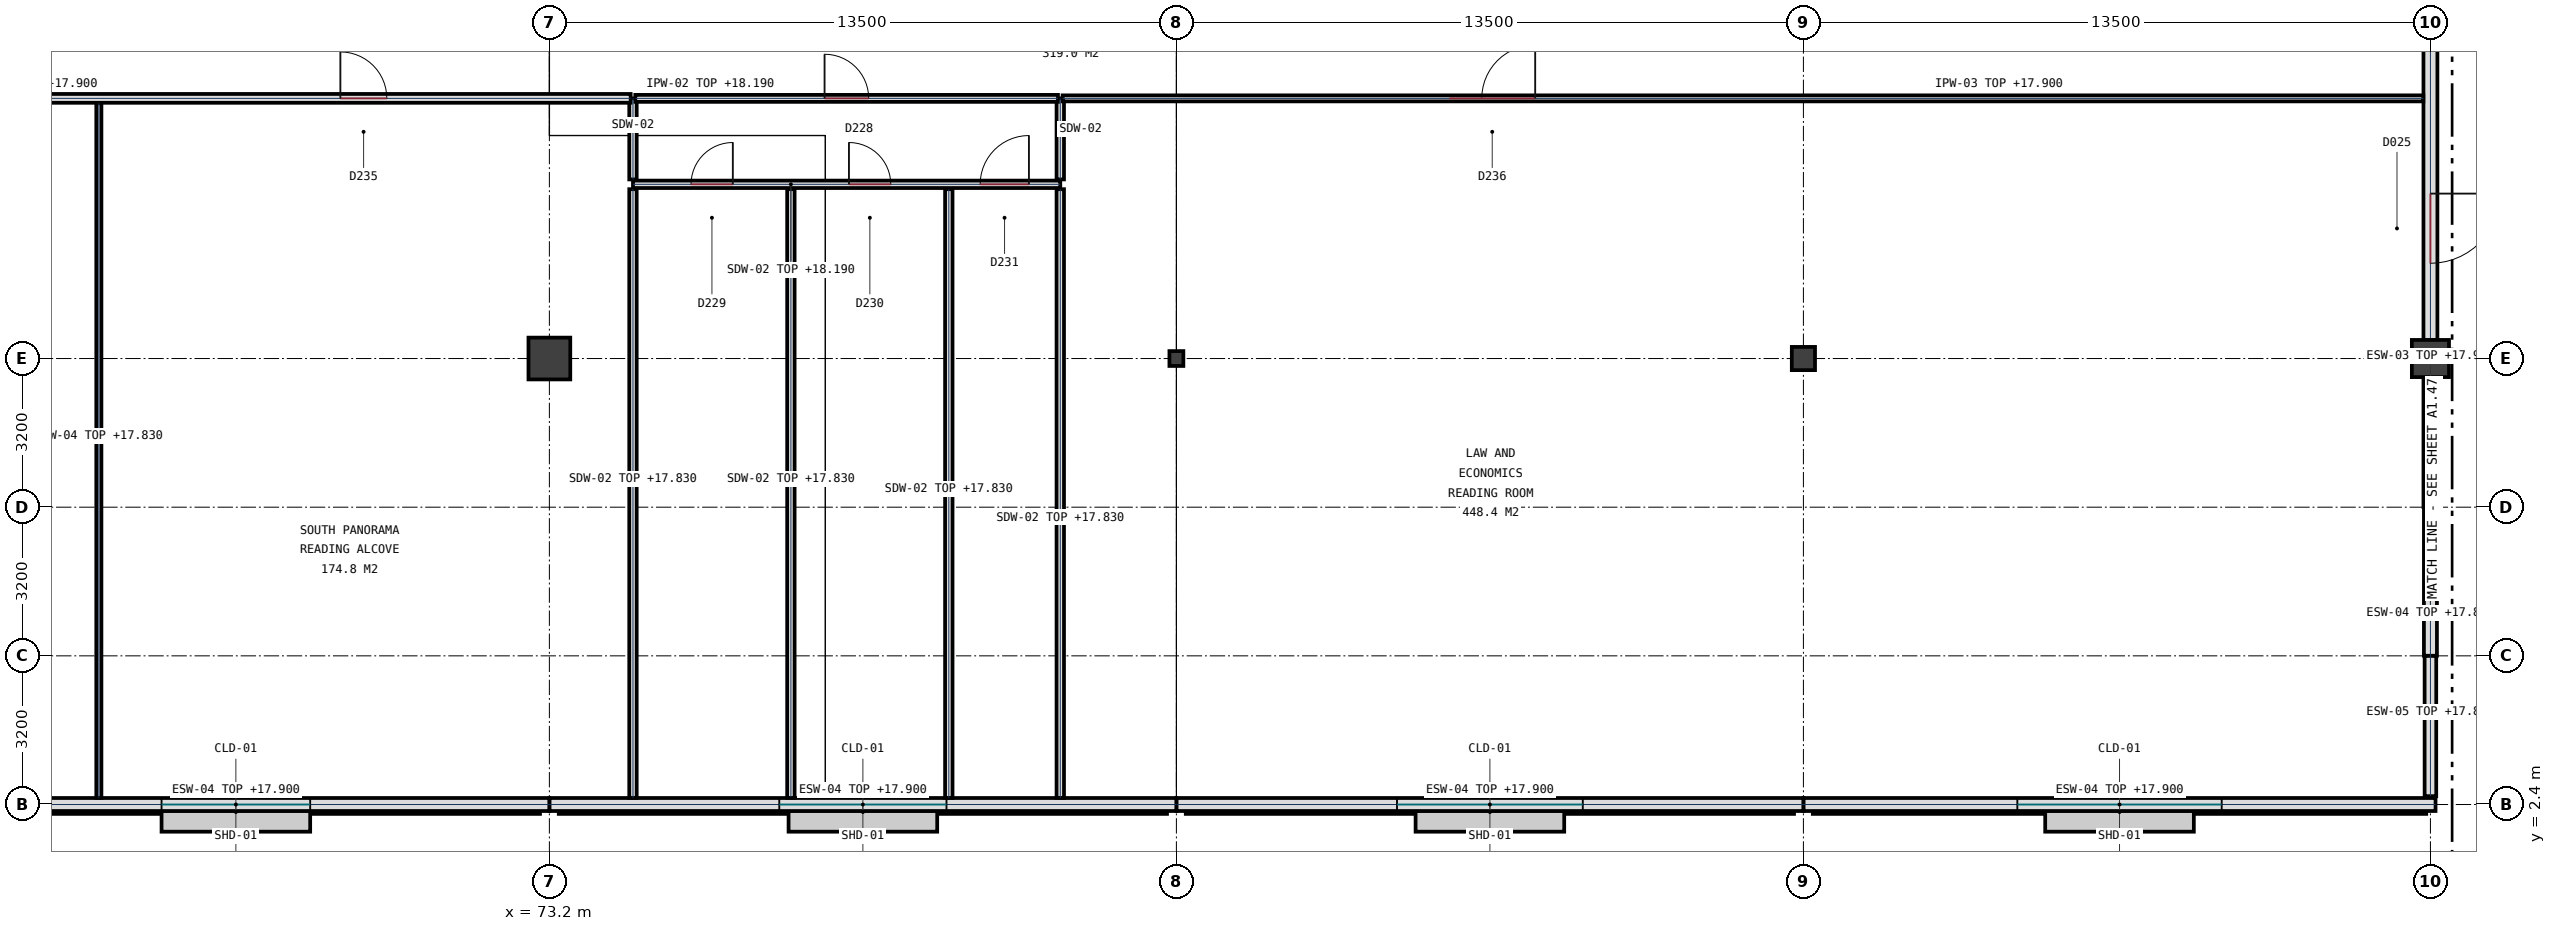
"""IFC4 building model, lengths in metres.
Left out: names, types, materials, properties, quantities, classifications, styles, units other than length and angle.
Written with IfcOpenShell. Run it as: python <this file> out.ifc"""

import sys

from ifc_helpers import new_model, si_unit, direction, frame, frame_2d, origin, origin_2d, place, context, subcontext, project, spatial, polyline, rectangle, circle, i_section, outline, extrude, element, fill, save


model = new_model("IFC4")
c1 = context("Model", 3, precision=1e-05, world=origin(), true_north=direction((0.0, 1.0)))
c2 = subcontext(c1, "Body", "Model", "MODEL_VIEW")
j1 = project(units=[si_unit("LENGTHUNIT", "METRE"), si_unit("PLANEANGLEUNIT", "RADIAN")], contexts=[c1])
p1 = place(None, origin())
s1 = spatial("IfcSite", under=j1, at=p1, CompositionType="ELEMENT")
p2 = place(p1, origin())
s2 = spatial("IfcBuilding", under=s1, at=p2, CompositionType="ELEMENT")
p3 = place(p2, frame((0.0, 0.0, 14.4)))
s3 = spatial("IfcBuildingStorey", under=s2, at=p3, CompositionType="ELEMENT", Elevation=14.4)
p4 = place(p3, frame((73.2, 12.0, 0.0), z_axis=(0.0, 0.0, 1.0), x_axis=(1.0, 0.0, 0.0)))
e1 = element("IfcColumn", 1, at=p4, inside=s3, PredefinedType="COLUMN", context=c2, shape_type="SweptSolid", body=[
    extrude(circle(Radius=0.45, at=origin_2d()), origin(), (0.0, 0.0, 1.0), 4.5),
])
p5 = place(p3, frame((86.7, 12.0, 0.0), z_axis=(0.0, 0.0, 1.0), x_axis=(1.0, 0.0, 0.0)))
e2 = element("IfcColumn", 2, at=p5, inside=s3, PredefinedType="COLUMN", context=c2, shape_type="SweptSolid", body=[
    extrude(i_section(OverallWidth=0.3, OverallDepth=0.32, WebThickness=0.011, FlangeThickness=0.021, FilletRadius=0.027, at=origin_2d()), origin(), (0.0, 0.0, 1.0), 4.5),
])
p6 = place(p3, frame((100.2, 12.0, 0.0), z_axis=(0.0, 0.0, 1.0), x_axis=(1.0, 0.0, 0.0)))
e3 = element("IfcColumn", 3, at=p6, inside=s3, PredefinedType="COLUMN", context=c2, shape_type="SweptSolid", body=[
    extrude(rectangle(XDim=0.5, YDim=0.5, at=origin_2d()), origin(), (0.0, 0.0, 1.0), 4.5),
])
p7 = place(p3, frame((113.7, 12.0, 0.0), z_axis=(0.0, 0.0, 1.0), x_axis=(1.0, 0.0, 0.0)))
e4 = element("IfcColumn", 4, at=p7, inside=s3, PredefinedType="COLUMN", context=c2, shape_type="SweptSolid", body=[
    extrude(circle(Radius=0.4, at=origin_2d()), origin(), (0.0, 0.0, 1.0), 4.5),
])
p8 = place(p3, frame((113.7, 21.399, 0.0), z_axis=(0.0, 0.0, 1.0), x_axis=(0.0, -1.0, 0.0)))
e5 = element("IfcWall", 5, at=p8, inside=s3, PredefinedType="SOLIDWALL", context=c2, shape_type="SweptSolid", body=[
    extrude(rectangle(XDim=9.001, YDim=0.3, at=frame_2d((4.5, 0.0))), origin(), (0.0, 0.0, 1.0), 3.5),
])
p9 = place(p8, frame((5.849, 0.0, 0.0)))
e6 = element("IfcOpeningElement", 6, at=p9, cuts=e5, PredefinedType="OPENING", context=c2, shape_type="SweptSolid", body=[
    extrude(rectangle(XDim=1.5, YDim=2.2, at=frame_2d((0.75, 1.1))), frame((0.0, 0.16, 0.0), z_axis=(0.0, -1.0, 0.0), x_axis=(1.0, 0.0, 0.0)), (0.0, 0.0, 1.0), 0.32),
])
p10 = place(p3, frame((113.7, 11.602, 0.0), z_axis=(0.0, 0.0, 1.0), x_axis=(0.0, -1.0, 0.0)))
e7 = element("IfcWall", 7, at=p10, inside=s3, PredefinedType="SOLIDWALL", context=c2, shape_type="SweptSolid", body=[
    extrude(rectangle(XDim=2.8, YDim=0.3, at=frame_2d((1.4, 0.0))), origin(), (0.0, 0.0, 1.0), 3.5),
])
p11 = place(p3, frame((113.7, 8.798, 0.0), z_axis=(0.0, 0.0, 1.0), x_axis=(0.0, -1.0, 0.0)))
e8 = element("IfcWall", 8, at=p11, inside=s3, PredefinedType="SOLIDWALL", context=c2, shape_type="SweptSolid", body=[
    extrude(rectangle(XDim=3.196, YDim=0.28, at=frame_2d((1.598, 0.0))), origin(), (0.0, 0.0, 1.0), 3.43),
])
p12 = place(p3, frame((113.7, 5.598, 0.0), z_axis=(0.0, 0.0, 1.0), x_axis=(0.0, -1.0, 0.0)))
e9 = element("IfcWall", 9, at=p12, inside=s3, PredefinedType="SOLIDWALL", context=c2, shape_type="SweptSolid", body=[
    extrude(rectangle(XDim=3.018, YDim=0.25, at=frame_2d((1.509, 0.0))), origin(), (0.0, 0.0, 1.0), 3.43),
])
p13 = place(p3, frame((113.81, 2.4, 0.0), z_axis=(0.0, 0.0, 1.0), x_axis=(-1.0, 0.0, 0.0)))
e10 = element("IfcWall", 10, at=p13, inside=s3, PredefinedType="SOLIDWALL", context=c2, shape_type="SweptSolid", body=[
    extrude(rectangle(XDim=13.608, YDim=0.28, at=frame_2d((6.804, 0.0))), origin(), (0.0, 0.0, 1.0), 3.5),
])
p14 = place(p13, frame((4.604, 0.0, 1.1)))
e11 = element("IfcOpeningElement", 11, at=p14, cuts=e10, PredefinedType="OPENING", context=c2, shape_type="SweptSolid", body=[
    extrude(outline(polyline([(0.425, 0.85), (0.28, 0.824), (0.152, 0.751), (0.057, 0.638), (0.006, 0.499), (0.006, 0.351), (0.057, 0.213), (0.152, 0.099), (0.28, 0.026), (0.425, 0.0), (3.975, 0.0), (4.12, 0.026), (4.248, 0.099), (4.343, 0.212), (4.394, 0.351), (4.394, 0.499), (4.343, 0.637), (4.248, 0.751), (4.12, 0.824), (3.975, 0.85), (0.425, 0.85)])), frame((0.0, 0.15, 0.0), z_axis=(0.0, -1.0, 0.0), x_axis=(1.0, 0.0, 0.0)), (0.0, 0.0, 1.0), 0.3),
])
p15 = place(p3, frame((100.198, 2.4, 0.0), z_axis=(0.0, 0.0, 1.0), x_axis=(-1.0, 0.0, 0.0)))
e12 = element("IfcWall", 12, at=p15, inside=s3, PredefinedType="SOLIDWALL", context=c2, shape_type="SweptSolid", body=[
    extrude(rectangle(XDim=13.496, YDim=0.28, at=frame_2d((6.748, 0.0))), origin(), (0.0, 0.0, 1.0), 3.5),
])
p16 = place(p15, frame((4.748, 0.0, 1.1)))
e13 = element("IfcOpeningElement", 13, at=p16, cuts=e12, PredefinedType="OPENING", context=c2, shape_type="SweptSolid", body=[
    extrude(outline(polyline([(0.425, 0.85), (0.28, 0.824), (0.152, 0.751), (0.057, 0.638), (0.006, 0.499), (0.006, 0.351), (0.057, 0.213), (0.152, 0.099), (0.28, 0.026), (0.425, 0.0), (3.575, 0.0), (3.72, 0.026), (3.848, 0.099), (3.943, 0.212), (3.994, 0.351), (3.994, 0.499), (3.943, 0.637), (3.848, 0.751), (3.72, 0.824), (3.575, 0.85), (0.425, 0.85)])), frame((0.0, 0.15, 0.0), z_axis=(0.0, -1.0, 0.0), x_axis=(1.0, 0.0, 0.0)), (0.0, 0.0, 1.0), 0.3),
])
p17 = place(p3, frame((86.698, 2.4, 0.0), z_axis=(0.0, 0.0, 1.0), x_axis=(-1.0, 0.0, 0.0)))
e14 = element("IfcWall", 14, at=p17, inside=s3, PredefinedType="SOLIDWALL", context=c2, shape_type="SweptSolid", body=[
    extrude(rectangle(XDim=13.496, YDim=0.28, at=frame_2d((6.748, 0.0))), origin(), (0.0, 0.0, 1.0), 3.5),
])
p18 = place(p17, frame((4.948, 0.0, 1.1)))
e15 = element("IfcOpeningElement", 15, at=p18, cuts=e14, PredefinedType="OPENING", context=c2, shape_type="SweptSolid", body=[
    extrude(outline(polyline([(0.4, 0.8), (0.263, 0.776), (0.143, 0.707), (0.054, 0.6), (0.006, 0.469), (0.006, 0.331), (0.054, 0.2), (0.143, 0.094), (0.263, 0.024), (0.4, 0.0), (3.2, 0.0), (3.337, 0.024), (3.457, 0.094), (3.546, 0.2), (3.594, 0.331), (3.594, 0.469), (3.546, 0.6), (3.457, 0.707), (3.337, 0.776), (3.2, 0.8), (0.4, 0.8)])), frame((0.0, 0.15, 0.0), z_axis=(0.0, -1.0, 0.0), x_axis=(1.0, 0.0, 0.0)), (0.0, 0.0, 1.0), 0.3),
])
p19 = place(p3, frame((73.198, 2.4, 0.0), z_axis=(0.0, 0.0, 1.0), x_axis=(-1.0, 0.0, 0.0)))
e16 = element("IfcWall", 16, at=p19, inside=s3, PredefinedType="SOLIDWALL", context=c2, shape_type="SweptSolid", body=[
    extrude(rectangle(XDim=13.496, YDim=0.28, at=frame_2d((6.748, 0.0))), origin(), (0.0, 0.0, 1.0), 3.5),
])
p20 = place(p19, frame((5.148, 0.0, 1.1)))
e17 = element("IfcOpeningElement", 17, at=p20, cuts=e16, PredefinedType="OPENING", context=c2, shape_type="SweptSolid", body=[
    extrude(outline(polyline([(0.4, 0.8), (0.263, 0.776), (0.143, 0.707), (0.054, 0.6), (0.006, 0.469), (0.006, 0.331), (0.054, 0.2), (0.143, 0.094), (0.263, 0.024), (0.4, 0.0), (2.8, 0.0), (2.937, 0.024), (3.057, 0.094), (3.146, 0.2), (3.194, 0.331), (3.194, 0.469), (3.146, 0.6), (3.057, 0.707), (2.937, 0.776), (2.8, 0.8), (0.4, 0.8)])), frame((0.0, 0.15, 0.0), z_axis=(0.0, -1.0, 0.0), x_axis=(1.0, 0.0, 0.0)), (0.0, 0.0, 1.0), 0.3),
])
p21 = place(p3, frame((75.0, 15.75, 0.0), z_axis=(0.0, 0.0, 1.0), x_axis=(1.0, 0.0, 0.0)))
e18 = element("IfcWall", 18, at=p21, inside=s3, PredefinedType="PLUMBINGWALL", context=c2, shape_type="SweptSolid", body=[
    extrude(rectangle(XDim=9.2, YDim=0.16, at=frame_2d((4.6, 0.0))), origin(), (0.0, 0.0, 1.0), 3.79),
])
p22 = place(p21, frame((1.25, 0.0, 0.0)))
e19 = element("IfcOpeningElement", 19, at=p22, cuts=e18, PredefinedType="OPENING", context=c2, shape_type="SweptSolid", body=[
    extrude(rectangle(XDim=0.9, YDim=2.1, at=frame_2d((0.45, 1.05))), frame((0.0, 0.09, 0.0), z_axis=(0.0, -1.0, 0.0), x_axis=(1.0, 0.0, 0.0)), (0.0, 0.0, 1.0), 0.18),
])
p23 = place(p21, frame((4.65, 0.0, 0.0)))
e20 = element("IfcOpeningElement", 20, at=p23, cuts=e18, PredefinedType="OPENING", context=c2, shape_type="SweptSolid", body=[
    extrude(rectangle(XDim=0.9, YDim=2.1, at=frame_2d((0.45, 1.05))), frame((0.0, 0.09, 0.0), z_axis=(0.0, -1.0, 0.0), x_axis=(1.0, 0.0, 0.0)), (0.0, 0.0, 1.0), 0.18),
])
p24 = place(p21, frame((7.475, 0.0, 0.0)))
e21 = element("IfcOpeningElement", 21, at=p24, cuts=e18, PredefinedType="OPENING", context=c2, shape_type="SweptSolid", body=[
    extrude(rectangle(XDim=1.05, YDim=2.15, at=frame_2d((0.525, 1.075))), frame((0.0, 0.09, 0.0), z_axis=(0.0, -1.0, 0.0), x_axis=(1.0, 0.0, 0.0)), (0.0, 0.0, 1.0), 0.18),
])
p25 = place(p3, frame((75.0, 2.543, 0.0), z_axis=(0.0, 0.0, 1.0), x_axis=(0.0, 1.0, 0.0)))
e22 = element("IfcWall", 22, at=p25, inside=s3, PredefinedType="PLUMBINGWALL", context=c2, shape_type="SweptSolid", body=[
    extrude(rectangle(XDim=13.102, YDim=0.16, at=frame_2d((6.551, 0.0))), origin(), (0.0, 0.0, 1.0), 3.43),
])
p26 = place(p3, frame((75.0, 15.855, 0.0), z_axis=(0.0, 0.0, 1.0), x_axis=(0.0, 1.0, 0.0)))
e23 = element("IfcWall", 23, at=p26, inside=s3, PredefinedType="PLUMBINGWALL", context=c2, shape_type="SweptSolid", body=[
    extrude(rectangle(XDim=1.745, YDim=0.16, at=frame_2d((0.873, 0.0))), origin(), (0.0, 0.0, 1.0), 4.16),
])
for number, where, z_axis, x_axis in (
    (24, (78.4, 2.543, 0.0), (0.0, 0.0, 1.0), (0.0, 1.0, 0.0)),
    (25, (81.8, 2.543, 0.0), (0.0, 0.0, 1.0), (0.0, 1.0, 0.0)),
    (26, (84.2, 2.543, 0.0), (0.0, 0.0, 1.0), (0.0, 1.0, 0.0)),
):
    element("IfcWall", number, at=place(p3, frame(where, z_axis=z_axis, x_axis=x_axis)), inside=s3, PredefinedType="PLUMBINGWALL", context=c2, shape_type="SweptSolid", body=[
        extrude(rectangle(XDim=13.102, YDim=0.16, at=frame_2d((6.551, 0.0))), origin(), (0.0, 0.0, 1.0), 3.43),
    ])
p27 = place(p3, frame((84.2, 15.855, 0.0), z_axis=(0.0, 0.0, 1.0), x_axis=(0.0, 1.0, 0.0)))
e27 = element("IfcWall", 27, at=p27, inside=s3, PredefinedType="PLUMBINGWALL", context=c2, shape_type="SweptSolid", body=[
    extrude(rectangle(XDim=1.745, YDim=0.16, at=frame_2d((0.873, 0.0))), origin(), (0.0, 0.0, 1.0), 4.16),
])
p28 = place(p3, frame((0.178, 17.6, 0.0), z_axis=(0.0, 0.0, 1.0), x_axis=(1.0, 0.0, 0.0)))
e28 = element("IfcWall", 28, at=p28, inside=s3, PredefinedType="PARTITIONING", context=c2, shape_type="SweptSolid", body=[
    extrude(rectangle(XDim=74.772, YDim=0.19, at=frame_2d((37.386, 0.0))), origin(), (0.0, 0.0, 1.0), 3.5),
])
p29 = place(p28, frame((15.822, 0.0, 0.0)))
e29 = element("IfcOpeningElement", 29, at=p29, cuts=e28, PredefinedType="OPENING", context=c2, shape_type="SweptSolid", body=[
    extrude(rectangle(XDim=1.0, YDim=2.2, at=frame_2d((0.5, 1.1))), frame((0.0, 0.105, 0.0), z_axis=(0.0, -1.0, 0.0), x_axis=(1.0, 0.0, 0.0)), (0.0, 0.0, 1.0), 0.21),
])
p30 = place(p28, frame((51.797, 0.0, 0.0)))
e30 = element("IfcOpeningElement", 30, at=p30, cuts=e28, PredefinedType="OPENING", context=c2, shape_type="SweptSolid", body=[
    extrude(rectangle(XDim=1.85, YDim=2.35, at=frame_2d((0.925, 1.175))), frame((0.0, 0.105, 0.0), z_axis=(0.0, -1.0, 0.0), x_axis=(1.0, 0.0, 0.0)), (0.0, 0.0, 1.0), 0.21),
])
p31 = place(p28, frame((68.522, 0.0, 0.0)))
e31 = element("IfcOpeningElement", 31, at=p31, cuts=e28, PredefinedType="OPENING", context=c2, shape_type="SweptSolid", body=[
    extrude(rectangle(XDim=1.0, YDim=2.2, at=frame_2d((0.5, 1.1))), frame((0.0, 0.105, 0.0), z_axis=(0.0, -1.0, 0.0), x_axis=(1.0, 0.0, 0.0)), (0.0, 0.0, 1.0), 0.21),
])
p32 = place(p3, frame((75.05, 17.6, 0.0), z_axis=(0.0, 0.0, 1.0), x_axis=(1.0, 0.0, 0.0)))
e32 = element("IfcWall", 32, at=p32, inside=s3, PredefinedType="PARTITIONING", context=c2, shape_type="SweptSolid", body=[
    extrude(rectangle(XDim=9.1, YDim=0.15, at=frame_2d((4.55, 0.0))), origin(), (0.0, 0.0, 1.0), 3.79),
])
p33 = place(p32, frame((4.075, 0.0, 0.0)))
e33 = element("IfcOpeningElement", 33, at=p33, cuts=e32, PredefinedType="OPENING", context=c2, shape_type="SweptSolid", body=[
    extrude(rectangle(XDim=0.95, YDim=2.15, at=frame_2d((0.475, 1.075))), frame((0.0, 0.085, 0.0), z_axis=(0.0, -1.0, 0.0), x_axis=(1.0, 0.0, 0.0)), (0.0, 0.0, 1.0), 0.17),
])
p34 = place(p3, frame((84.25, 17.6, 0.0), z_axis=(0.0, 0.0, 1.0), x_axis=(1.0, 0.0, 0.0)))
e34 = element("IfcWall", 34, at=p34, inside=s3, PredefinedType="PARTITIONING", context=c2, shape_type="SweptSolid", body=[
    extrude(rectangle(XDim=29.297, YDim=0.13, at=frame_2d((14.648, 0.0))), origin(), (0.0, 0.0, 1.0), 3.5),
])
p35 = place(p34, frame((8.325, 0.0, 0.0)))
e35 = element("IfcOpeningElement", 35, at=p35, cuts=e34, PredefinedType="OPENING", context=c2, shape_type="SweptSolid", body=[
    extrude(rectangle(XDim=1.85, YDim=2.35, at=frame_2d((0.925, 1.175))), frame((0.0, 0.075, 0.0), z_axis=(0.0, -1.0, 0.0), x_axis=(1.0, 0.0, 0.0)), (0.0, 0.0, 1.0), 0.15),
])
p36 = place(p3, frame((63.5, 2.543, 0.0), z_axis=(0.0, 0.0, 1.0), x_axis=(0.0, 1.0, 0.0)))
e36 = element("IfcWall", 36, at=p36, inside=s3, PredefinedType="PARTITIONING", context=c2, shape_type="SweptSolid", body=[
    extrude(rectangle(XDim=14.952, YDim=0.11, at=frame_2d((7.476, 0.0))), origin(), (0.0, 0.0, 1.0), 3.43),
])
p37 = place(p9, origin())
e37 = element("IfcDoor", 37, at=p37, inside=s3, OperationType="SINGLE_SWING_LEFT", PredefinedType="DOOR", context=c2, shape_type="SweptSolid", body=[
    extrude(rectangle(XDim=1.5, YDim=2.2, at=frame_2d((0.75, 1.1))), frame((0.0, 0.032, 0.0), z_axis=(0.0, -1.0, 0.0), x_axis=(1.0, 0.0, 0.0)), (0.0, 0.0, 1.0), 0.065),
])
fill(e6, e37)
p38 = place(p14, origin())
e38 = element("IfcWindow", 38, at=p38, inside=s3, PartitioningType="SINGLE_PANEL", PredefinedType="WINDOW", context=c2, shape_type="SweptSolid", body=[
    extrude(outline(polyline([(0.425, 0.85), (0.28, 0.824), (0.152, 0.751), (0.057, 0.638), (0.006, 0.499), (0.006, 0.351), (0.057, 0.213), (0.152, 0.099), (0.28, 0.026), (0.425, 0.0), (3.975, 0.0), (4.12, 0.026), (4.248, 0.099), (4.343, 0.212), (4.394, 0.351), (4.394, 0.499), (4.343, 0.637), (4.248, 0.751), (4.12, 0.824), (3.975, 0.85), (0.425, 0.85)])), frame((0.0, 0.032, 0.0), z_axis=(0.0, -1.0, 0.0), x_axis=(1.0, 0.0, 0.0)), (0.0, 0.0, 1.0), 0.065),
])
fill(e11, e38)
p39 = place(p16, origin())
e39 = element("IfcWindow", 39, at=p39, inside=s3, PartitioningType="SINGLE_PANEL", PredefinedType="WINDOW", context=c2, shape_type="SweptSolid", body=[
    extrude(outline(polyline([(0.425, 0.85), (0.28, 0.824), (0.152, 0.751), (0.057, 0.638), (0.006, 0.499), (0.006, 0.351), (0.057, 0.213), (0.152, 0.099), (0.28, 0.026), (0.425, 0.0), (3.575, 0.0), (3.72, 0.026), (3.848, 0.099), (3.943, 0.212), (3.994, 0.351), (3.994, 0.499), (3.943, 0.637), (3.848, 0.751), (3.72, 0.824), (3.575, 0.85), (0.425, 0.85)])), frame((0.0, 0.032, 0.0), z_axis=(0.0, -1.0, 0.0), x_axis=(1.0, 0.0, 0.0)), (0.0, 0.0, 1.0), 0.065),
])
fill(e13, e39)
p40 = place(p18, origin())
e40 = element("IfcWindow", 40, at=p40, inside=s3, PartitioningType="SINGLE_PANEL", PredefinedType="WINDOW", context=c2, shape_type="SweptSolid", body=[
    extrude(outline(polyline([(0.4, 0.8), (0.263, 0.776), (0.143, 0.707), (0.054, 0.6), (0.006, 0.469), (0.006, 0.331), (0.054, 0.2), (0.143, 0.094), (0.263, 0.024), (0.4, 0.0), (3.2, 0.0), (3.337, 0.024), (3.457, 0.094), (3.546, 0.2), (3.594, 0.331), (3.594, 0.469), (3.546, 0.6), (3.457, 0.707), (3.337, 0.776), (3.2, 0.8), (0.4, 0.8)])), frame((0.0, 0.032, 0.0), z_axis=(0.0, -1.0, 0.0), x_axis=(1.0, 0.0, 0.0)), (0.0, 0.0, 1.0), 0.065),
])
fill(e15, e40)
p41 = place(p20, origin())
e41 = element("IfcWindow", 41, at=p41, inside=s3, PartitioningType="SINGLE_PANEL", PredefinedType="WINDOW", context=c2, shape_type="SweptSolid", body=[
    extrude(outline(polyline([(0.4, 0.8), (0.263, 0.776), (0.143, 0.707), (0.054, 0.6), (0.006, 0.469), (0.006, 0.331), (0.054, 0.2), (0.143, 0.094), (0.263, 0.024), (0.4, 0.0), (2.8, 0.0), (2.937, 0.024), (3.057, 0.094), (3.146, 0.2), (3.194, 0.331), (3.194, 0.469), (3.146, 0.6), (3.057, 0.707), (2.937, 0.776), (2.8, 0.8), (0.4, 0.8)])), frame((0.0, 0.032, 0.0), z_axis=(0.0, -1.0, 0.0), x_axis=(1.0, 0.0, 0.0)), (0.0, 0.0, 1.0), 0.065),
])
fill(e17, e41)
p42 = place(p33, origin())
e42 = element("IfcDoor", 42, at=p42, inside=s3, OperationType="SINGLE_SWING_LEFT", PredefinedType="DOOR", context=c2, shape_type="SweptSolid", body=[
    extrude(rectangle(XDim=0.95, YDim=2.15, at=frame_2d((0.475, 1.075))), frame((0.0, 0.032, 0.0), z_axis=(0.0, -1.0, 0.0), x_axis=(1.0, 0.0, 0.0)), (0.0, 0.0, 1.0), 0.065),
])
fill(e33, e42)
p43 = place(p22, origin())
e43 = element("IfcDoor", 43, at=p43, inside=s3, OperationType="SINGLE_SWING_RIGHT", PredefinedType="DOOR", context=c2, shape_type="SweptSolid", body=[
    extrude(rectangle(XDim=0.9, YDim=2.1, at=frame_2d((0.45, 1.05))), frame((0.0, 0.032, 0.0), z_axis=(0.0, -1.0, 0.0), x_axis=(1.0, 0.0, 0.0)), (0.0, 0.0, 1.0), 0.065),
])
fill(e19, e43)
p44 = place(p23, origin())
e44 = element("IfcDoor", 44, at=p44, inside=s3, OperationType="SINGLE_SWING_LEFT", PredefinedType="DOOR", context=c2, shape_type="SweptSolid", body=[
    extrude(rectangle(XDim=0.9, YDim=2.1, at=frame_2d((0.45, 1.05))), frame((0.0, 0.032, 0.0), z_axis=(0.0, -1.0, 0.0), x_axis=(1.0, 0.0, 0.0)), (0.0, 0.0, 1.0), 0.065),
])
fill(e20, e44)
p45 = place(p24, origin())
e45 = element("IfcDoor", 45, at=p45, inside=s3, OperationType="SINGLE_SWING_RIGHT", PredefinedType="DOOR", context=c2, shape_type="SweptSolid", body=[
    extrude(rectangle(XDim=1.05, YDim=2.15, at=frame_2d((0.525, 1.075))), frame((0.0, 0.032, 0.0), z_axis=(0.0, -1.0, 0.0), x_axis=(1.0, 0.0, 0.0)), (0.0, 0.0, 1.0), 0.065),
])
fill(e21, e45)
p46 = place(p31, origin())
e46 = element("IfcDoor", 46, at=p46, inside=s3, OperationType="SINGLE_SWING_LEFT", PredefinedType="DOOR", context=c2, shape_type="SweptSolid", body=[
    extrude(rectangle(XDim=1.0, YDim=2.2, at=frame_2d((0.5, 1.1))), frame((0.0, 0.032, 0.0), z_axis=(0.0, -1.0, 0.0), x_axis=(1.0, 0.0, 0.0)), (0.0, 0.0, 1.0), 0.065),
])
fill(e31, e46)
p47 = place(p35, origin())
e47 = element("IfcDoor", 47, at=p47, inside=s3, OperationType="SINGLE_SWING_RIGHT", PredefinedType="DOOR", context=c2, shape_type="SweptSolid", body=[
    extrude(rectangle(XDim=1.85, YDim=2.35, at=frame_2d((0.925, 1.175))), frame((0.0, 0.032, 0.0), z_axis=(0.0, -1.0, 0.0), x_axis=(1.0, 0.0, 0.0)), (0.0, 0.0, 1.0), 0.065),
])
fill(e35, e47)
save(model, sys.argv[1])
